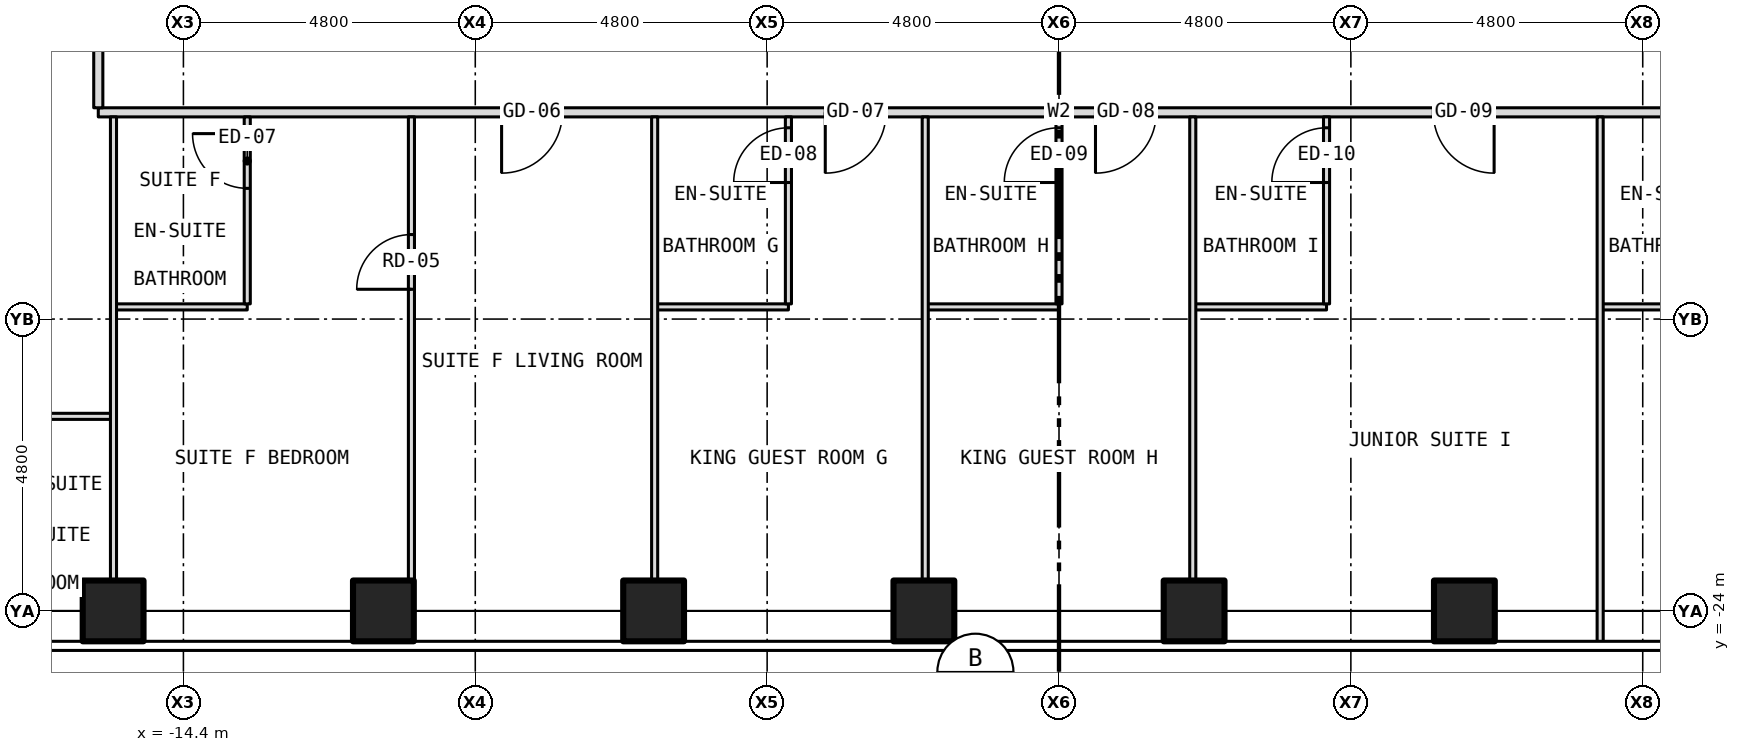
"""IFC4 building model, lengths in metres.
Left out: names, types, materials, properties, quantities, classifications, styles, units other than length and angle.
Written with IfcOpenShell. Run it as: python <this file> out.ifc"""

import sys

from ifc_helpers import new_model, si_unit, direction, frame, frame_2d, origin, origin_2d, place, context, subcontext, project, spatial, rectangle, hollow_rectangle, extrude, element, fill, save


model = new_model("IFC4")
c1 = context("Model", 3, precision=1e-05, world=origin(), true_north=direction((0.0, 1.0)))
c2 = subcontext(c1, "Body", "Model", "MODEL_VIEW")
j1 = project(units=[si_unit("LENGTHUNIT", "METRE"), si_unit("PLANEANGLEUNIT", "RADIAN")], contexts=[c1])
p1 = place(None, origin())
s1 = spatial("IfcSite", under=j1, at=p1, CompositionType="ELEMENT")
p2 = place(p1, origin())
s2 = spatial("IfcBuilding", under=s1, at=p2, CompositionType="ELEMENT")
p3 = place(p2, frame((0.0, 0.0, 42.5)))
s3 = spatial("IfcBuildingStorey", under=s2, at=p3, CompositionType="ELEMENT", Elevation=42.5)
for number, where, z_axis, x_axis in (
    (1, (-15.556, -24.0, -0.15), (0.0, 0.0, 1.0), (1.0, 0.0, 0.0)),
    (2, (-11.111, -24.0, -0.15), (0.0, 0.0, 1.0), (1.0, 0.0, 0.0)),
    (3, (-6.667, -24.0, -0.15), (0.0, 0.0, 1.0), (1.0, 0.0, 0.0)),
    (4, (-2.222, -24.0, -0.15), (0.0, 0.0, 1.0), (1.0, 0.0, 0.0)),
    (5, (2.222, -24.0, -0.15), (0.0, 0.0, 1.0), (1.0, 0.0, 0.0)),
    (6, (6.667, -24.0, -0.15), (0.0, 0.0, 1.0), (1.0, 0.0, 0.0)),
):
    element("IfcColumn", number, at=place(p3, frame(where, z_axis=z_axis, x_axis=x_axis)), inside=s3, PredefinedType="COLUMN", context=c2, shape_type="SweptSolid", body=[
        extrude(hollow_rectangle(XDim=1.0, YDim=1.0, WallThickness=0.06, at=origin_2d()), origin(), (0.0, 0.0, 1.0), 3.5),
    ])
p4 = place(p3, frame((-18.2, -20.8, 0.0), z_axis=(0.0, 0.0, 1.0), x_axis=(1.0, 0.0, 0.0)))
e7 = element("IfcWall", 7, at=p4, inside=s3, PredefinedType="PARTITIONING", context=c2, shape_type="SweptSolid", body=[
    extrude(rectangle(XDim=2.65, YDim=0.1, at=frame_2d((1.325, 0.0))), origin(), (0.0, 0.0, 1.0), 3.35),
])
for number, where, z_axis, x_axis in (
    (8, (-15.55, -19.0, 0.0), (0.0, 0.0, 1.0), (1.0, 0.0, 0.0)),
    (9, (-6.65, -19.0, 0.0), (0.0, 0.0, 1.0), (1.0, 0.0, 0.0)),
    (10, (-2.2, -19.0, 0.0), (0.0, 0.0, 1.0), (1.0, 0.0, 0.0)),
    (11, (2.2, -19.0, 0.0), (0.0, 0.0, 1.0), (1.0, 0.0, 0.0)),
):
    element("IfcWall", number, at=place(p3, frame(where, z_axis=z_axis, x_axis=x_axis)), inside=s3, PredefinedType="PARTITIONING", context=c2, shape_type="SweptSolid", body=[
        extrude(rectangle(XDim=2.2, YDim=0.1, at=frame_2d((1.1, 0.0))), origin(), (0.0, 0.0, 1.0), 3.35),
    ])
p5 = place(p3, frame((8.9, -19.0, 0.0), z_axis=(0.0, 0.0, 1.0), x_axis=(1.0, 0.0, 0.0)))
e12 = element("IfcWall", 12, at=p5, inside=s3, PredefinedType="PARTITIONING", context=c2, shape_type="SweptSolid", body=[
    extrude(rectangle(XDim=2.2, YDim=0.1, at=frame_2d((1.1, 0.0))), origin(), (0.0, 0.0, 1.0), 3.35),
])
p6 = place(p3, frame((-15.8, -15.8, 0.0), z_axis=(0.0, 0.0, 1.0), x_axis=(1.0, 0.0, 0.0)))
e13 = element("IfcWall", 13, at=p6, inside=s3, PredefinedType="PARTITIONING", context=c2, shape_type="SweptSolid", body=[
    extrude(rectangle(XDim=31.6, YDim=0.15, at=frame_2d((15.8, 0.0))), origin(), (0.0, 0.0, 1.0), 3.35),
])
p7 = place(p6, frame((6.633, 0.0, 0.0)))
e14 = element("IfcOpeningElement", 14, at=p7, cuts=e13, PredefinedType="OPENING", context=c2, shape_type="SweptSolid", body=[
    extrude(rectangle(XDim=1.0, YDim=2.1, at=frame_2d((0.5, 1.05))), frame((0.0, 0.087, 0.0), z_axis=(0.0, -1.0, 0.0), x_axis=(1.0, 0.0, 0.0)), (0.0, 0.0, 1.0), 0.174),
])
p8 = place(p6, frame((11.956, 0.0, 0.0)))
e15 = element("IfcOpeningElement", 15, at=p8, cuts=e13, PredefinedType="OPENING", context=c2, shape_type="SweptSolid", body=[
    extrude(rectangle(XDim=1.0, YDim=2.1, at=frame_2d((0.5, 1.05))), frame((0.0, 0.087, 0.0), z_axis=(0.0, -1.0, 0.0), x_axis=(1.0, 0.0, 0.0)), (0.0, 0.0, 1.0), 0.174),
])
p9 = place(p6, frame((16.4, 0.0, 0.0)))
e16 = element("IfcOpeningElement", 16, at=p9, cuts=e13, PredefinedType="OPENING", context=c2, shape_type="SweptSolid", body=[
    extrude(rectangle(XDim=1.0, YDim=2.1, at=frame_2d((0.5, 1.05))), frame((0.0, 0.087, 0.0), z_axis=(0.0, -1.0, 0.0), x_axis=(1.0, 0.0, 0.0)), (0.0, 0.0, 1.0), 0.174),
])
p10 = place(p6, frame((21.956, 0.0, 0.0)))
e17 = element("IfcOpeningElement", 17, at=p10, cuts=e13, PredefinedType="OPENING", context=c2, shape_type="SweptSolid", body=[
    extrude(rectangle(XDim=1.0, YDim=2.1, at=frame_2d((0.5, 1.05))), frame((0.0, 0.087, 0.0), z_axis=(0.0, -1.0, 0.0), x_axis=(1.0, 0.0, 0.0)), (0.0, 0.0, 1.0), 0.174),
])
p11 = place(p6, frame((28.623, 0.0, 0.0)))
e18 = element("IfcOpeningElement", 18, at=p11, cuts=e13, PredefinedType="OPENING", context=c2, shape_type="SweptSolid", body=[
    extrude(rectangle(XDim=1.0, YDim=2.1, at=frame_2d((0.5, 1.05))), frame((0.0, 0.087, 0.0), z_axis=(0.0, -1.0, 0.0), x_axis=(1.0, 0.0, 0.0)), (0.0, 0.0, 1.0), 0.174),
])
p12 = place(p3, frame((-15.8, -15.725, 0.0), z_axis=(0.0, 0.0, 1.0), x_axis=(0.0, 1.0, 0.0)))
e19 = element("IfcWall", 19, at=p12, inside=s3, PredefinedType="PARTITIONING", context=c2, shape_type="SweptSolid", body=[
    extrude(rectangle(XDim=4.805, YDim=0.15, at=frame_2d((2.403, 0.0))), origin(), (0.0, 0.0, 1.0), 3.35),
])
p13 = place(p12, frame((3.025, 0.0, 0.0)))
e20 = element("IfcOpeningElement", 20, at=p13, cuts=e19, PredefinedType="OPENING", context=c2, shape_type="SweptSolid", body=[
    extrude(rectangle(XDim=1.0, YDim=2.1, at=frame_2d((0.5, 1.05))), frame((0.0, 0.087, 0.0), z_axis=(0.0, -1.0, 0.0), x_axis=(1.0, 0.0, 0.0)), (0.0, 0.0, 1.0), 0.174),
])
p14 = place(p3, frame((-15.55, -23.88, 0.0), z_axis=(0.0, 0.0, 1.0), x_axis=(0.0, 1.0, 0.0)))
e21 = element("IfcWall", 21, at=p14, inside=s3, PredefinedType="PARTITIONING", context=c2, shape_type="SweptSolid", body=[
    extrude(rectangle(XDim=8.005, YDim=0.1, at=frame_2d((4.002, 0.0))), origin(), (0.0, 0.0, 1.0), 3.35),
])
p15 = place(p3, frame((-13.35, -18.95, 0.0), z_axis=(0.0, 0.0, 1.0), x_axis=(0.0, 1.0, 0.0)))
e22 = element("IfcWall", 22, at=p15, inside=s3, PredefinedType="PARTITIONING", context=c2, shape_type="SweptSolid", body=[
    extrude(rectangle(XDim=3.075, YDim=0.1, at=frame_2d((1.538, 0.0))), origin(), (0.0, 0.0, 1.0), 3.35),
])
p16 = place(p15, frame((1.9, 0.0, 0.0)))
e23 = element("IfcOpeningElement", 23, at=p16, cuts=e22, PredefinedType="OPENING", context=c2, shape_type="SweptSolid", body=[
    extrude(rectangle(XDim=0.9, YDim=2.1, at=frame_2d((0.45, 1.05))), frame((0.0, 0.062, 0.0), z_axis=(0.0, -1.0, 0.0), x_axis=(1.0, 0.0, 0.0)), (0.0, 0.0, 1.0), 0.124),
])
p17 = place(p3, frame((-10.65, -23.88, 0.0), z_axis=(0.0, 0.0, 1.0), x_axis=(0.0, 1.0, 0.0)))
e24 = element("IfcWall", 24, at=p17, inside=s3, PredefinedType="PARTITIONING", context=c2, shape_type="SweptSolid", body=[
    extrude(rectangle(XDim=8.005, YDim=0.1, at=frame_2d((4.002, 0.0))), origin(), (0.0, 0.0, 1.0), 3.35),
])
p18 = place(p17, frame((5.17, 0.0, 0.0)))
e25 = element("IfcOpeningElement", 25, at=p18, cuts=e24, PredefinedType="OPENING", context=c2, shape_type="SweptSolid", body=[
    extrude(rectangle(XDim=0.9, YDim=2.1, at=frame_2d((0.45, 1.05))), frame((0.0, 0.062, 0.0), z_axis=(0.0, -1.0, 0.0), x_axis=(1.0, 0.0, 0.0)), (0.0, 0.0, 1.0), 0.124),
])
p19 = place(p3, frame((-6.65, -23.88, 0.0), z_axis=(0.0, 0.0, 1.0), x_axis=(0.0, 1.0, 0.0)))
e26 = element("IfcWall", 26, at=p19, inside=s3, PredefinedType="PARTITIONING", context=c2, shape_type="SweptSolid", body=[
    extrude(rectangle(XDim=8.005, YDim=0.1, at=frame_2d((4.002, 0.0))), origin(), (0.0, 0.0, 1.0), 3.35),
])
p20 = place(p3, frame((-4.45, -18.95, 0.0), z_axis=(0.0, 0.0, 1.0), x_axis=(0.0, 1.0, 0.0)))
e27 = element("IfcWall", 27, at=p20, inside=s3, PredefinedType="PARTITIONING", context=c2, shape_type="SweptSolid", body=[
    extrude(rectangle(XDim=3.075, YDim=0.1, at=frame_2d((1.538, 0.0))), origin(), (0.0, 0.0, 1.0), 3.35),
])
p21 = place(p20, frame((1.996, 0.0, 0.0)))
e28 = element("IfcOpeningElement", 28, at=p21, cuts=e27, PredefinedType="OPENING", context=c2, shape_type="SweptSolid", body=[
    extrude(rectangle(XDim=0.9, YDim=2.1, at=frame_2d((0.45, 1.05))), frame((0.0, 0.062, 0.0), z_axis=(0.0, -1.0, 0.0), x_axis=(1.0, 0.0, 0.0)), (0.0, 0.0, 1.0), 0.124),
])
p22 = place(p3, frame((-2.2, -23.88, 0.0), z_axis=(0.0, 0.0, 1.0), x_axis=(0.0, 1.0, 0.0)))
e29 = element("IfcWall", 29, at=p22, inside=s3, PredefinedType="PARTITIONING", context=c2, shape_type="SweptSolid", body=[
    extrude(rectangle(XDim=8.005, YDim=0.1, at=frame_2d((4.002, 0.0))), origin(), (0.0, 0.0, 1.0), 3.35),
])
p23 = place(p3, frame((0.0, -18.95, 0.0), z_axis=(0.0, 0.0, 1.0), x_axis=(0.0, 1.0, 0.0)))
e30 = element("IfcWall", 30, at=p23, inside=s3, PredefinedType="PARTITIONING", context=c2, shape_type="SweptSolid", body=[
    extrude(rectangle(XDim=3.075, YDim=0.1, at=frame_2d((1.538, 0.0))), origin(), (0.0, 0.0, 1.0), 2.728),
])
p24 = place(p23, frame((1.996, 0.0, 0.0)))
e31 = element("IfcOpeningElement", 31, at=p24, cuts=e30, PredefinedType="OPENING", context=c2, shape_type="SweptSolid", body=[
    extrude(rectangle(XDim=0.9, YDim=2.1, at=frame_2d((0.45, 1.05))), frame((0.0, 0.062, 0.0), z_axis=(0.0, -1.0, 0.0), x_axis=(1.0, 0.0, 0.0)), (0.0, 0.0, 1.0), 0.124),
])
p25 = place(p3, frame((2.2, -23.88, 0.0), z_axis=(0.0, 0.0, 1.0), x_axis=(0.0, 1.0, 0.0)))
e32 = element("IfcWall", 32, at=p25, inside=s3, PredefinedType="PARTITIONING", context=c2, shape_type="SweptSolid", body=[
    extrude(rectangle(XDim=8.005, YDim=0.1, at=frame_2d((4.002, 0.0))), origin(), (0.0, 0.0, 1.0), 3.35),
])
p26 = place(p3, frame((4.4, -18.95, 0.0), z_axis=(0.0, 0.0, 1.0), x_axis=(0.0, 1.0, 0.0)))
e33 = element("IfcWall", 33, at=p26, inside=s3, PredefinedType="PARTITIONING", context=c2, shape_type="SweptSolid", body=[
    extrude(rectangle(XDim=3.075, YDim=0.1, at=frame_2d((1.538, 0.0))), origin(), (0.0, 0.0, 1.0), 3.35),
])
p27 = place(p26, frame((1.996, 0.0, 0.0)))
e34 = element("IfcOpeningElement", 34, at=p27, cuts=e33, PredefinedType="OPENING", context=c2, shape_type="SweptSolid", body=[
    extrude(rectangle(XDim=0.9, YDim=2.1, at=frame_2d((0.45, 1.05))), frame((0.0, 0.062, 0.0), z_axis=(0.0, -1.0, 0.0), x_axis=(1.0, 0.0, 0.0)), (0.0, 0.0, 1.0), 0.124),
])
p28 = place(p3, frame((8.9, -24.53, 0.0), z_axis=(0.0, 0.0, 1.0), x_axis=(0.0, 1.0, 0.0)))
e35 = element("IfcWall", 35, at=p28, inside=s3, PredefinedType="PARTITIONING", context=c2, shape_type="SweptSolid", body=[
    extrude(rectangle(XDim=8.655, YDim=0.1, at=frame_2d((4.328, 0.0))), origin(), (0.0, 0.0, 1.0), 3.35),
])
p29 = place(p7, origin())
e36 = element("IfcDoor", 36, at=p29, inside=s3, OperationType="SINGLE_SWING_LEFT", PredefinedType="DOOR", context=c2, shape_type="SweptSolid", body=[
    extrude(rectangle(XDim=1.0, YDim=2.1, at=frame_2d((0.5, 1.05))), frame((0.0, 0.025, 0.0), z_axis=(0.0, -1.0, 0.0), x_axis=(1.0, 0.0, 0.0)), (0.0, 0.0, 1.0), 0.05),
])
fill(e14, e36)
p30 = place(p18, origin())
e37 = element("IfcDoor", 37, at=p30, inside=s3, OperationType="SINGLE_SWING_LEFT", PredefinedType="DOOR", context=c2, shape_type="SweptSolid", body=[
    extrude(rectangle(XDim=0.9, YDim=2.1, at=frame_2d((0.45, 1.05))), frame((0.0, 0.025, 0.0), z_axis=(0.0, -1.0, 0.0), x_axis=(1.0, 0.0, 0.0)), (0.0, 0.0, 1.0), 0.05),
])
fill(e25, e37)
p31 = place(p16, origin())
e38 = element("IfcDoor", 38, at=p31, inside=s3, OperationType="SINGLE_SWING_RIGHT", PredefinedType="DOOR", context=c2, shape_type="SweptSolid", body=[
    extrude(rectangle(XDim=0.9, YDim=2.1, at=frame_2d((0.45, 1.05))), frame((0.0, 0.025, 0.0), z_axis=(0.0, -1.0, 0.0), x_axis=(1.0, 0.0, 0.0)), (0.0, 0.0, 1.0), 0.05),
])
fill(e23, e38)
p32 = place(p8, origin())
e39 = element("IfcDoor", 39, at=p32, inside=s3, OperationType="SINGLE_SWING_LEFT", PredefinedType="DOOR", context=c2, shape_type="SweptSolid", body=[
    extrude(rectangle(XDim=1.0, YDim=2.1, at=frame_2d((0.5, 1.05))), frame((0.0, 0.025, 0.0), z_axis=(0.0, -1.0, 0.0), x_axis=(1.0, 0.0, 0.0)), (0.0, 0.0, 1.0), 0.05),
])
fill(e15, e39)
p33 = place(p21, origin())
e40 = element("IfcDoor", 40, at=p33, inside=s3, OperationType="SINGLE_SWING_LEFT", PredefinedType="DOOR", context=c2, shape_type="SweptSolid", body=[
    extrude(rectangle(XDim=0.9, YDim=2.1, at=frame_2d((0.45, 1.05))), frame((0.0, 0.025, 0.0), z_axis=(0.0, -1.0, 0.0), x_axis=(1.0, 0.0, 0.0)), (0.0, 0.0, 1.0), 0.05),
])
fill(e28, e40)
p34 = place(p9, origin())
e41 = element("IfcDoor", 41, at=p34, inside=s3, OperationType="SINGLE_SWING_LEFT", PredefinedType="DOOR", context=c2, shape_type="SweptSolid", body=[
    extrude(rectangle(XDim=1.0, YDim=2.1, at=frame_2d((0.5, 1.05))), frame((0.0, 0.025, 0.0), z_axis=(0.0, -1.0, 0.0), x_axis=(1.0, 0.0, 0.0)), (0.0, 0.0, 1.0), 0.05),
])
fill(e16, e41)
p35 = place(p24, origin())
e42 = element("IfcDoor", 42, at=p35, inside=s3, OperationType="SINGLE_SWING_LEFT", PredefinedType="DOOR", context=c2, shape_type="SweptSolid", body=[
    extrude(rectangle(XDim=0.9, YDim=2.1, at=frame_2d((0.45, 1.05))), frame((0.0, 0.025, 0.0), z_axis=(0.0, -1.0, 0.0), x_axis=(1.0, 0.0, 0.0)), (0.0, 0.0, 1.0), 0.05),
])
fill(e31, e42)
p36 = place(p10, origin())
e43 = element("IfcDoor", 43, at=p36, inside=s3, OperationType="SINGLE_SWING_RIGHT", PredefinedType="DOOR", context=c2, shape_type="SweptSolid", body=[
    extrude(rectangle(XDim=1.0, YDim=2.1, at=frame_2d((0.5, 1.05))), frame((0.0, 0.025, 0.0), z_axis=(0.0, -1.0, 0.0), x_axis=(1.0, 0.0, 0.0)), (0.0, 0.0, 1.0), 0.05),
])
fill(e17, e43)
p37 = place(p27, origin())
e44 = element("IfcDoor", 44, at=p37, inside=s3, OperationType="SINGLE_SWING_LEFT", PredefinedType="DOOR", context=c2, shape_type="SweptSolid", body=[
    extrude(rectangle(XDim=0.9, YDim=2.1, at=frame_2d((0.45, 1.05))), frame((0.0, 0.025, 0.0), z_axis=(0.0, -1.0, 0.0), x_axis=(1.0, 0.0, 0.0)), (0.0, 0.0, 1.0), 0.05),
])
fill(e34, e44)
save(model, sys.argv[1])
